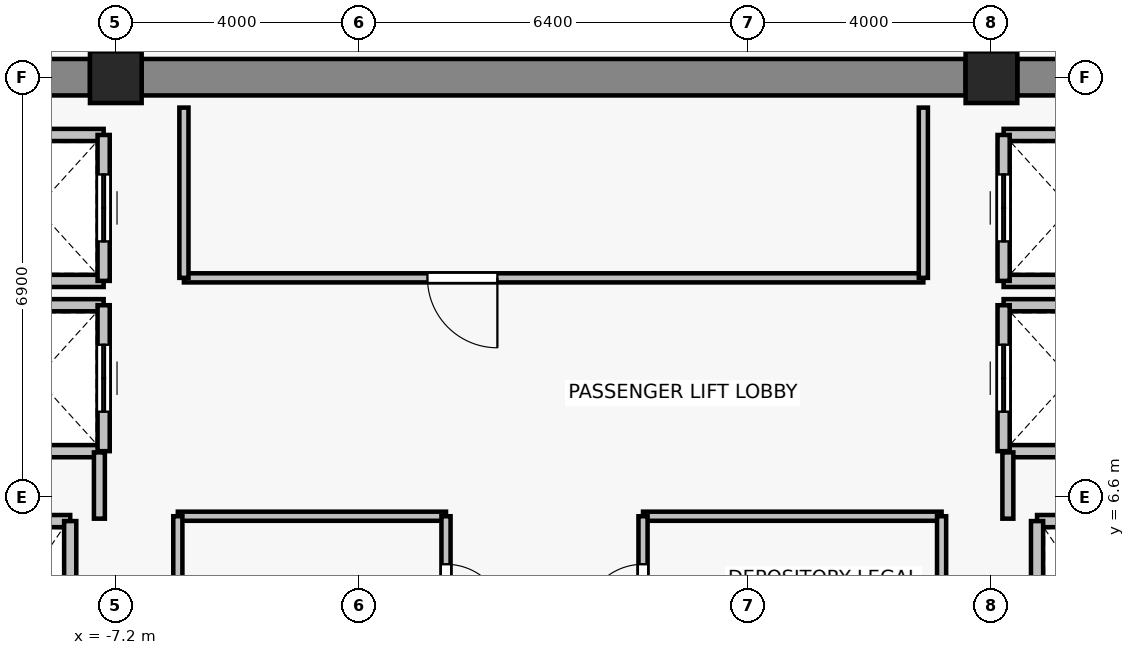
"""IFC4 building model, lengths in metres.
Left out: names, types, materials, properties, quantities, classifications, styles, units other than length and angle.
Written with IfcOpenShell. Run it as: python <this file> out.ifc"""

import sys

from ifc_helpers import new_model, si_unit, direction, frame, frame_2d, origin, origin_2d, place, context, subcontext, project, spatial, rectangle, extrude, source, transform, mapped, element, fill, save


model = new_model("IFC4")
c1 = context("Model", 3, precision=1e-05, world=origin(), true_north=direction((0.0, 1.0)))
c2 = subcontext(c1, "Body", "Model", "MODEL_VIEW")
j1 = project(units=[si_unit("LENGTHUNIT", "METRE"), si_unit("PLANEANGLEUNIT", "RADIAN")], contexts=[c1])
p1 = place(None, origin())
s1 = spatial("IfcSite", under=j1, at=p1, CompositionType="ELEMENT")
p2 = place(p1, origin())
s2 = spatial("IfcBuilding", under=s1, at=p2, CompositionType="ELEMENT")
p3 = place(p2, frame((0.0, 0.0, 251.8)))
s3 = spatial("IfcBuildingStorey", under=s2, at=p3, CompositionType="ELEMENT", Elevation=251.8)
for number, where, z_axis, x_axis in (
    (1, (-7.2, 13.5, 0.0), (0.0, 0.0, 1.0), (1.0, 0.0, 0.0)),
    (2, (7.2, 13.5, 0.0), (0.0, 0.0, 1.0), (1.0, 0.0, 0.0)),
):
    element("IfcColumn", number, at=place(p3, frame(where, z_axis=z_axis, x_axis=x_axis)), inside=s3, PredefinedType="COLUMN", context=c2, shape_type="SweptSolid", body=[
        extrude(rectangle(XDim=0.85, YDim=0.85, at=origin_2d()), origin(), (0.0, 0.0, 1.0), 3.3),
    ])
p4 = place(p3, frame((-13.975, 13.5, 0.0), z_axis=(0.0, 0.0, 1.0), x_axis=(1.0, 0.0, 0.0)))
e3 = element("IfcWall", 3, at=p4, inside=s3, PredefinedType="SHEAR", context=c2, shape_type="SweptSolid", body=[
    extrude(rectangle(XDim=6.35, YDim=0.6, at=frame_2d((3.175, 0.0))), origin(), (0.0, 0.0, 1.0), 3.075),
])
p5 = place(p3, frame((-6.775, 13.5, 0.0), z_axis=(0.0, 0.0, 1.0), x_axis=(1.0, 0.0, 0.0)))
e4 = element("IfcWall", 4, at=p5, inside=s3, PredefinedType="SHEAR", context=c2, shape_type="SweptSolid", body=[
    extrude(rectangle(XDim=13.55, YDim=0.6, at=frame_2d((6.775, 0.0))), origin(), (0.0, 0.0, 1.0), 3.075),
])
p6 = place(p3, frame((7.625, 13.5, 0.0), z_axis=(0.0, 0.0, 1.0), x_axis=(1.0, 0.0, 0.0)))
e5 = element("IfcWall", 5, at=p6, inside=s3, PredefinedType="SHEAR", context=c2, shape_type="SweptSolid", body=[
    extrude(rectangle(XDim=6.35, YDim=0.6, at=frame_2d((3.175, 0.0))), origin(), (0.0, 0.0, 1.0), 3.075),
])
p7 = place(p3, frame((-9.95, 6.2, 0.0), z_axis=(0.0, 0.0, 1.0), x_axis=(1.0, 0.0, 0.0)))
e6 = element("IfcWall", 6, at=p7, inside=s3, PredefinedType="SOLIDWALL", context=c2, shape_type="SweptSolid", body=[
    extrude(rectangle(XDim=2.0, YDim=0.2, at=frame_2d((1.0, 0.0))), origin(), (0.0, 0.0, 1.0), 3.075),
])
p8 = place(p3, frame((-7.95, 6.2, 0.0), z_axis=(0.0, 0.0, 1.0), x_axis=(0.0, -1.0, 0.0)))
e7 = element("IfcWall", 7, at=p8, inside=s3, PredefinedType="SOLIDWALL", context=c2, shape_type="SweptSolid", body=[
    extrude(rectangle(XDim=2.8, YDim=0.2, at=frame_2d((1.4, 0.0))), origin(), (0.0, 0.0, 1.0), 3.075),
])
p9 = place(p3, frame((7.95, 6.2, 0.0), z_axis=(0.0, 0.0, 1.0), x_axis=(1.0, 0.0, 0.0)))
e8 = element("IfcWall", 8, at=p9, inside=s3, PredefinedType="SOLIDWALL", context=c2, shape_type="SweptSolid", body=[
    extrude(rectangle(XDim=2.0, YDim=0.2, at=frame_2d((1.0, 0.0))), origin(), (0.0, 0.0, 1.0), 3.075),
])
p10 = place(p3, frame((7.95, 3.4, 0.0), z_axis=(0.0, 0.0, 1.0), x_axis=(0.0, 1.0, 0.0)))
e9 = element("IfcWall", 9, at=p10, inside=s3, PredefinedType="SOLIDWALL", context=c2, shape_type="SweptSolid", body=[
    extrude(rectangle(XDim=2.8, YDim=0.2, at=frame_2d((1.4, 0.0))), origin(), (0.0, 0.0, 1.0), 3.075),
])
for number, where, z_axis, x_axis in (
    (10, (-7.4, 7.35, 0.0), (0.0, 0.0, 1.0), (-1.0, 0.0, 0.0)),
    (11, (-9.6, 9.75, 0.0), (0.0, 0.0, 1.0), (1.0, 0.0, 0.0)),
):
    element("IfcWall", number, at=place(p3, frame(where, z_axis=z_axis, x_axis=x_axis)), inside=s3, PredefinedType="SOLIDWALL", context=c2, shape_type="SweptSolid", body=[
        extrude(rectangle(XDim=2.2, YDim=0.2, at=frame_2d((1.1, 0.0))), origin(), (0.0, 0.0, 1.0), 2.615),
    ])
p11 = place(p3, frame((-7.4, 9.75, 0.0), z_axis=(0.0, 0.0, 1.0), x_axis=(0.0, -1.0, 0.0)))
e12 = element("IfcWall", 12, at=p11, inside=s3, PredefinedType="SOLIDWALL", context=c2, shape_type="SweptSolid", body=[
    extrude(rectangle(XDim=2.4, YDim=0.2, at=frame_2d((1.2, 0.0))), origin(), (0.0, 0.0, 1.0), 2.615),
])
p12 = place(p11, frame((0.65, 0.0, 0.0)))
e13 = element("IfcOpeningElement", 13, at=p12, cuts=e12, PredefinedType="OPENING", context=c2, shape_type="SweptSolid", body=[
    extrude(rectangle(XDim=1.1, YDim=2.2, at=frame_2d((0.55, 1.1))), frame((0.0, 0.11, 0.0), z_axis=(0.0, -1.0, 0.0), x_axis=(1.0, 0.0, 0.0)), (0.0, 0.0, 1.0), 0.22),
])
for number, where, z_axis, x_axis in (
    (14, (-7.4, 10.15, 0.0), (0.0, 0.0, 1.0), (-1.0, 0.0, 0.0)),
    (15, (-9.6, 12.55, 0.0), (0.0, 0.0, 1.0), (1.0, 0.0, 0.0)),
):
    element("IfcWall", number, at=place(p3, frame(where, z_axis=z_axis, x_axis=x_axis)), inside=s3, PredefinedType="SOLIDWALL", context=c2, shape_type="SweptSolid", body=[
        extrude(rectangle(XDim=2.2, YDim=0.2, at=frame_2d((1.1, 0.0))), origin(), (0.0, 0.0, 1.0), 2.615),
    ])
p13 = place(p3, frame((-7.4, 12.55, 0.0), z_axis=(0.0, 0.0, 1.0), x_axis=(0.0, -1.0, 0.0)))
e16 = element("IfcWall", 16, at=p13, inside=s3, PredefinedType="SOLIDWALL", context=c2, shape_type="SweptSolid", body=[
    extrude(rectangle(XDim=2.4, YDim=0.2, at=frame_2d((1.2, 0.0))), origin(), (0.0, 0.0, 1.0), 2.615),
])
p14 = place(p13, frame((0.65, 0.0, 0.0)))
e17 = element("IfcOpeningElement", 17, at=p14, cuts=e16, PredefinedType="OPENING", context=c2, shape_type="SweptSolid", body=[
    extrude(rectangle(XDim=1.1, YDim=2.2, at=frame_2d((0.55, 1.1))), frame((0.0, 0.11, 0.0), z_axis=(0.0, -1.0, 0.0), x_axis=(1.0, 0.0, 0.0)), (0.0, 0.0, 1.0), 0.22),
])
for number, where, z_axis, x_axis in (
    (18, (9.6, 7.35, 0.0), (0.0, 0.0, 1.0), (-1.0, 0.0, 0.0)),
    (19, (7.4, 9.75, 0.0), (0.0, 0.0, 1.0), (1.0, 0.0, 0.0)),
):
    element("IfcWall", number, at=place(p3, frame(where, z_axis=z_axis, x_axis=x_axis)), inside=s3, PredefinedType="SOLIDWALL", context=c2, shape_type="SweptSolid", body=[
        extrude(rectangle(XDim=2.2, YDim=0.2, at=frame_2d((1.1, 0.0))), origin(), (0.0, 0.0, 1.0), 2.615),
    ])
p15 = place(p3, frame((7.4, 7.35, 0.0), z_axis=(0.0, 0.0, 1.0), x_axis=(0.0, 1.0, 0.0)))
e20 = element("IfcWall", 20, at=p15, inside=s3, PredefinedType="SOLIDWALL", context=c2, shape_type="SweptSolid", body=[
    extrude(rectangle(XDim=2.4, YDim=0.2, at=frame_2d((1.2, 0.0))), origin(), (0.0, 0.0, 1.0), 2.615),
])
p16 = place(p15, frame((0.65, 0.0, 0.0)))
e21 = element("IfcOpeningElement", 21, at=p16, cuts=e20, PredefinedType="OPENING", context=c2, shape_type="SweptSolid", body=[
    extrude(rectangle(XDim=1.1, YDim=2.2, at=frame_2d((0.55, 1.1))), frame((0.0, 0.11, 0.0), z_axis=(0.0, -1.0, 0.0), x_axis=(1.0, 0.0, 0.0)), (0.0, 0.0, 1.0), 0.22),
])
for number, where, z_axis, x_axis in (
    (22, (9.6, 10.15, 0.0), (0.0, 0.0, 1.0), (-1.0, 0.0, 0.0)),
    (23, (7.4, 12.55, 0.0), (0.0, 0.0, 1.0), (1.0, 0.0, 0.0)),
):
    element("IfcWall", number, at=place(p3, frame(where, z_axis=z_axis, x_axis=x_axis)), inside=s3, PredefinedType="SOLIDWALL", context=c2, shape_type="SweptSolid", body=[
        extrude(rectangle(XDim=2.2, YDim=0.2, at=frame_2d((1.1, 0.0))), origin(), (0.0, 0.0, 1.0), 2.615),
    ])
p17 = place(p3, frame((7.4, 10.15, 0.0), z_axis=(0.0, 0.0, 1.0), x_axis=(0.0, 1.0, 0.0)))
e24 = element("IfcWall", 24, at=p17, inside=s3, PredefinedType="SOLIDWALL", context=c2, shape_type="SweptSolid", body=[
    extrude(rectangle(XDim=2.4, YDim=0.2, at=frame_2d((1.2, 0.0))), origin(), (0.0, 0.0, 1.0), 2.615),
])
p18 = place(p17, frame((0.65, 0.0, 0.0)))
e25 = element("IfcOpeningElement", 25, at=p18, cuts=e24, PredefinedType="OPENING", context=c2, shape_type="SweptSolid", body=[
    extrude(rectangle(XDim=1.1, YDim=2.2, at=frame_2d((0.55, 1.1))), frame((0.0, 0.11, 0.0), z_axis=(0.0, -1.0, 0.0), x_axis=(1.0, 0.0, 0.0)), (0.0, 0.0, 1.0), 0.22),
])
for number, where, z_axis, x_axis in (
    (26, (-7.47, 7.33, 0.0), (0.0, 0.0, 1.0), (0.0, -1.0, 0.0)),
    (27, (7.47, 6.24, 0.0), (0.0, 0.0, 1.0), (0.0, 1.0, 0.0)),
):
    element("IfcWall", number, at=place(p3, frame(where, z_axis=z_axis, x_axis=x_axis)), inside=s3, PredefinedType="PARTITIONING", context=c2, shape_type="SweptSolid", body=[
        extrude(rectangle(XDim=1.09, YDim=0.18, at=frame_2d((0.545, 0.0))), origin(), (0.0, 0.0, 1.0), 2.615),
    ])
p19 = place(p3, frame((6.08, 10.2, 0.0), z_axis=(0.0, 0.0, 1.0), x_axis=(-1.0, 0.0, 0.0)))
e28 = element("IfcWall", 28, at=p19, inside=s3, PredefinedType="PARTITIONING", context=c2, shape_type="SweptSolid", body=[
    extrude(rectangle(XDim=12.16, YDim=0.15, at=frame_2d((6.08, 0.0))), origin(), (0.0, 0.0, 1.0), 3.075),
])
p20 = place(p19, frame((7.005, 0.0, 0.0)))
e29 = element("IfcOpeningElement", 29, at=p20, cuts=e28, PredefinedType="OPENING", context=c2, shape_type="SweptSolid", body=[
    extrude(rectangle(XDim=1.15, YDim=2.15, at=frame_2d((0.575, 1.075))), frame((0.0, 0.085, 0.0), z_axis=(0.0, -1.0, 0.0), x_axis=(1.0, 0.0, 0.0)), (0.0, 0.0, 1.0), 0.17),
])
for number, where, z_axis, x_axis in (
    (30, (-6.08, 10.2, 0.0), (0.0, 0.0, 1.0), (0.0, 1.0, 0.0)),
    (31, (6.08, 13.0, 0.0), (0.0, 0.0, 1.0), (0.0, -1.0, 0.0)),
):
    element("IfcWall", number, at=place(p3, frame(where, z_axis=z_axis, x_axis=x_axis)), inside=s3, PredefinedType="PARTITIONING", context=c2, shape_type="SweptSolid", body=[
        extrude(rectangle(XDim=2.8, YDim=0.15, at=frame_2d((1.4, 0.0))), origin(), (0.0, 0.0, 1.0), 3.075),
    ])
p21 = place(p3, frame((-6.18, 6.28, 0.0), z_axis=(0.0, 0.0, 1.0), x_axis=(1.0, 0.0, 0.0)))
e32 = element("IfcWall", 32, at=p21, inside=s3, PredefinedType="PARTITIONING", context=c2, shape_type="SweptSolid", body=[
    extrude(rectangle(XDim=4.41, YDim=0.15, at=frame_2d((2.205, 0.0))), origin(), (0.0, 0.0, 1.0), 3.075),
])
p22 = place(p3, frame((-6.18, 3.76, 0.0), z_axis=(0.0, 0.0, 1.0), x_axis=(0.0, 1.0, 0.0)))
e33 = element("IfcWall", 33, at=p22, inside=s3, PredefinedType="PARTITIONING", context=c2, shape_type="SweptSolid", body=[
    extrude(rectangle(XDim=2.52, YDim=0.15, at=frame_2d((1.26, 0.0))), origin(), (0.0, 0.0, 1.0), 3.075),
])
p23 = place(p3, frame((-1.77, 6.28, 0.0), z_axis=(0.0, 0.0, 1.0), x_axis=(0.0, -1.0, 0.0)))
e34 = element("IfcWall", 34, at=p23, inside=s3, PredefinedType="PARTITIONING", context=c2, shape_type="SweptSolid", body=[
    extrude(rectangle(XDim=2.52, YDim=0.15, at=frame_2d((1.26, 0.0))), origin(), (0.0, 0.0, 1.0), 3.075),
])
p24 = place(p23, frame((0.79, 0.0, 0.0)))
e35 = element("IfcOpeningElement", 35, at=p24, cuts=e34, PredefinedType="OPENING", context=c2, shape_type="SweptSolid", body=[
    extrude(rectangle(XDim=0.98, YDim=2.15, at=frame_2d((0.49, 1.075))), frame((0.0, 0.085, 0.0), z_axis=(0.0, -1.0, 0.0), x_axis=(1.0, 0.0, 0.0)), (0.0, 0.0, 1.0), 0.17),
])
p25 = place(p3, frame((1.47, 6.28, 0.0), z_axis=(0.0, 0.0, 1.0), x_axis=(1.0, 0.0, 0.0)))
e36 = element("IfcWall", 36, at=p25, inside=s3, PredefinedType="PARTITIONING", context=c2, shape_type="SweptSolid", body=[
    extrude(rectangle(XDim=4.91, YDim=0.15, at=frame_2d((2.455, 0.0))), origin(), (0.0, 0.0, 1.0), 3.075),
])
p26 = place(p3, frame((1.47, 3.76, 0.0), z_axis=(0.0, 0.0, 1.0), x_axis=(0.0, 1.0, 0.0)))
e37 = element("IfcWall", 37, at=p26, inside=s3, PredefinedType="PARTITIONING", context=c2, shape_type="SweptSolid", body=[
    extrude(rectangle(XDim=2.52, YDim=0.15, at=frame_2d((1.26, 0.0))), origin(), (0.0, 0.0, 1.0), 3.075),
])
p27 = place(p26, frame((0.75, 0.0, 0.0)))
e38 = element("IfcOpeningElement", 38, at=p27, cuts=e37, PredefinedType="OPENING", context=c2, shape_type="SweptSolid", body=[
    extrude(rectangle(XDim=0.98, YDim=2.15, at=frame_2d((0.49, 1.075))), frame((0.0, 0.085, 0.0), z_axis=(0.0, -1.0, 0.0), x_axis=(1.0, 0.0, 0.0)), (0.0, 0.0, 1.0), 0.17),
])
p28 = place(p3, frame((6.38, 6.28, 0.0), z_axis=(0.0, 0.0, 1.0), x_axis=(0.0, -1.0, 0.0)))
e39 = element("IfcWall", 39, at=p28, inside=s3, PredefinedType="PARTITIONING", context=c2, shape_type="SweptSolid", body=[
    extrude(rectangle(XDim=2.52, YDim=0.15, at=frame_2d((1.26, 0.0))), origin(), (0.0, 0.0, 1.0), 3.075),
])
m1 = source(origin(), c2, "Body", "SweptSolid", [
    extrude(rectangle(XDim=1.1, YDim=2.2, at=frame_2d((0.55, 1.1))), frame((0.0, 0.025, 0.0), z_axis=(0.0, -1.0, 0.0), x_axis=(1.0, 0.0, 0.0)), (0.0, 0.0, 1.0), 0.05),
])
p29 = place(p12, origin())
e40 = element("IfcDoor", 40, at=p29, inside=s3, OperationType="DOUBLE_DOOR_SLIDING", PredefinedType="DOOR", context=c2, shape_type="MappedRepresentation", body=[
    mapped(m1, transform((0.0, 0.0, 0.0), x_axis=(1.0, 0.0, 0.0), y_axis=(0.0, 1.0, 0.0), z_axis=(0.0, 0.0, 1.0), scale=1.0)),
])
fill(e13, e40)
p30 = place(p14, origin())
e41 = element("IfcDoor", 41, at=p30, inside=s3, OperationType="DOUBLE_DOOR_SLIDING", PredefinedType="DOOR", context=c2, shape_type="MappedRepresentation", body=[
    mapped(m1, transform((0.0, 0.0, 0.0), x_axis=(1.0, 0.0, 0.0), y_axis=(0.0, 1.0, 0.0), z_axis=(0.0, 0.0, 1.0), scale=1.0)),
])
fill(e17, e41)
p31 = place(p16, origin())
e42 = element("IfcDoor", 42, at=p31, inside=s3, OperationType="DOUBLE_DOOR_SLIDING", PredefinedType="DOOR", context=c2, shape_type="MappedRepresentation", body=[
    mapped(m1, transform((0.0, 0.0, 0.0), x_axis=(1.0, 0.0, 0.0), y_axis=(0.0, 1.0, 0.0), z_axis=(0.0, 0.0, 1.0), scale=1.0)),
])
fill(e21, e42)
p32 = place(p18, origin())
e43 = element("IfcDoor", 43, at=p32, inside=s3, OperationType="DOUBLE_DOOR_SLIDING", PredefinedType="DOOR", context=c2, shape_type="MappedRepresentation", body=[
    mapped(m1, transform((0.0, 0.0, 0.0), x_axis=(1.0, 0.0, 0.0), y_axis=(0.0, 1.0, 0.0), z_axis=(0.0, 0.0, 1.0), scale=1.0)),
])
fill(e25, e43)
m2 = source(origin(), c2, "Body", "SweptSolid", [
    extrude(rectangle(XDim=1.15, YDim=2.15, at=frame_2d((0.575, 1.075))), frame((0.0, 0.025, 0.0), z_axis=(0.0, -1.0, 0.0), x_axis=(1.0, 0.0, 0.0)), (0.0, 0.0, 1.0), 0.05),
])
p33 = place(p20, origin())
e44 = element("IfcDoor", 44, at=p33, inside=s3, OperationType="SINGLE_SWING_LEFT", PredefinedType="DOOR", context=c2, shape_type="MappedRepresentation", body=[
    mapped(m2, transform((0.0, 0.0, 0.0), x_axis=(1.0, 0.0, 0.0), y_axis=(0.0, 1.0, 0.0), z_axis=(0.0, 0.0, 1.0), scale=1.0)),
])
fill(e29, e44)
m3 = source(origin(), c2, "Body", "SweptSolid", [
    extrude(rectangle(XDim=0.98, YDim=2.15, at=frame_2d((0.49, 1.075))), frame((0.0, 0.025, 0.0), z_axis=(0.0, -1.0, 0.0), x_axis=(1.0, 0.0, 0.0)), (0.0, 0.0, 1.0), 0.05),
])
p34 = place(p24, origin())
e45 = element("IfcDoor", 45, at=p34, inside=s3, OperationType="SINGLE_SWING_RIGHT", PredefinedType="DOOR", context=c2, shape_type="MappedRepresentation", body=[
    mapped(m3, transform((0.0, 0.0, 0.0), x_axis=(1.0, 0.0, 0.0), y_axis=(0.0, 1.0, 0.0), z_axis=(0.0, 0.0, 1.0), scale=1.0)),
])
fill(e35, e45)
p35 = place(p27, origin())
e46 = element("IfcDoor", 46, at=p35, inside=s3, OperationType="SINGLE_SWING_LEFT", PredefinedType="DOOR", context=c2, shape_type="MappedRepresentation", body=[
    mapped(m3, transform((0.0, 0.0, 0.0), x_axis=(1.0, 0.0, 0.0), y_axis=(0.0, 1.0, 0.0), z_axis=(0.0, 0.0, 1.0), scale=1.0)),
])
fill(e38, e46)
save(model, sys.argv[1])
